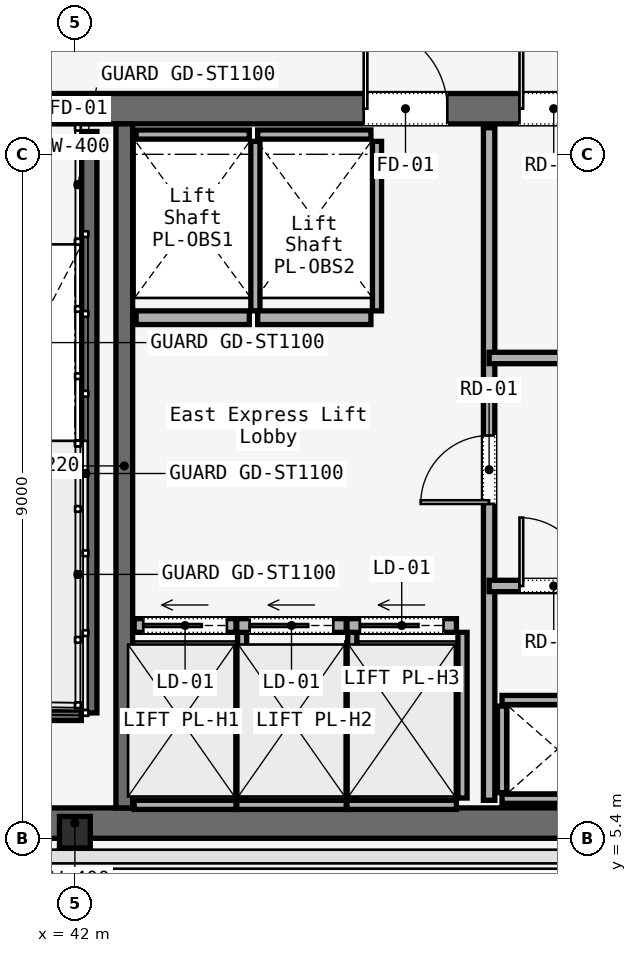
"""IFC4 building model, lengths in metres.
Left out: names, types, materials, properties, quantities, classifications, styles, units other than length and angle.
Written with IfcOpenShell. Run it as: python <this file> out.ifc"""

import sys

from ifc_helpers import new_model, si_unit, direction, frame, frame_2d, origin, origin_2d, place, context, subcontext, project, spatial, rectangle, i_section, extrude, element, fill, save


model = new_model("IFC4")
c1 = context("Model", 3, precision=1e-05, world=origin(), true_north=direction((0.0, 1.0)))
c2 = subcontext(c1, "Body", "Model", "MODEL_VIEW")
j1 = project(units=[si_unit("LENGTHUNIT", "METRE"), si_unit("PLANEANGLEUNIT", "RADIAN")], contexts=[c1])
p1 = place(None, origin())
s1 = spatial("IfcSite", under=j1, at=p1, CompositionType="ELEMENT")
p2 = place(p1, origin())
s2 = spatial("IfcBuilding", under=s1, at=p2, CompositionType="ELEMENT")
p3 = place(p2, frame((0.0, 0.0, 275.0)))
s3 = spatial("IfcBuildingStorey", under=s2, at=p3, CompositionType="ELEMENT", Elevation=275.0)
p4 = place(p3, frame((26.45, 15.0, 0.0), z_axis=(0.0, 0.0, 1.0), x_axis=(1.0, 0.0, 0.0)))
e1 = element("IfcWall", 1, at=p4, inside=s3, PredefinedType="SOLIDWALL", context=c2, shape_type="SweptSolid", body=[
    extrude(rectangle(XDim=31.1, YDim=0.4, at=frame_2d((15.55, 0.0))), origin(), (0.0, 0.0, 1.0), 3.52),
])
p5 = place(p4, frame((1.65, 0.0, 0.0)))
e2 = element("IfcOpeningElement", 2, at=p5, cuts=e1, PredefinedType="OPENING", context=c2, shape_type="SweptSolid", body=[
    extrude(rectangle(XDim=1.1, YDim=2.2, at=frame_2d((0.55, 1.1))), frame((0.0, 0.2, 0.0), z_axis=(0.0, -1.0, 0.0), x_axis=(1.0, 0.0, 0.0)), (0.0, 0.0, 1.0), 0.4),
])
p6 = place(p4, frame((13.65, 0.0, 0.0)))
e3 = element("IfcOpeningElement", 3, at=p6, cuts=e1, PredefinedType="OPENING", context=c2, shape_type="SweptSolid", body=[
    extrude(rectangle(XDim=1.1, YDim=2.2, at=frame_2d((0.55, 1.1))), frame((0.0, 0.2, 0.0), z_axis=(0.0, -1.0, 0.0), x_axis=(1.0, 0.0, 0.0)), (0.0, 0.0, 1.0), 0.4),
])
p7 = place(p4, frame((25.55, 0.0, 0.0)))
e4 = element("IfcOpeningElement", 4, at=p7, cuts=e1, PredefinedType="OPENING", context=c2, shape_type="SweptSolid", body=[
    extrude(rectangle(XDim=1.1, YDim=2.2, at=frame_2d((0.55, 1.1))), frame((0.0, 0.2, 0.0), z_axis=(0.0, -1.0, 0.0), x_axis=(1.0, 0.0, 0.0)), (0.0, 0.0, 1.0), 0.4),
])
p8 = place(p4, frame((19.35, 0.0, 0.0)))
e5 = element("IfcOpeningElement", 5, at=p8, cuts=e1, PredefinedType="OPENING", context=c2, shape_type="SweptSolid", body=[
    extrude(rectangle(XDim=1.1, YDim=2.2, at=frame_2d((0.55, 1.1))), frame((0.0, 0.2, 0.0), z_axis=(0.0, -1.0, 0.0), x_axis=(1.0, 0.0, 0.0)), (0.0, 0.0, 1.0), 0.4),
])
p9 = place(p4, frame((21.4, 0.0, 0.0)))
e6 = element("IfcOpeningElement", 6, at=p9, cuts=e1, PredefinedType="OPENING", context=c2, shape_type="SweptSolid", body=[
    extrude(rectangle(XDim=0.9, YDim=2.1, at=frame_2d((0.45, 1.05))), frame((0.0, 0.2, 0.0), z_axis=(0.0, -1.0, 0.0), x_axis=(1.0, 0.0, 0.0)), (0.0, 0.0, 1.0), 0.4),
])
p10 = place(p4, frame((5.54, 0.0, 0.0)))
e7 = element("IfcOpeningElement", 7, at=p10, cuts=e1, PredefinedType="OPENING", context=c2, shape_type="SweptSolid", body=[
    extrude(rectangle(XDim=0.95, YDim=2.2, at=frame_2d((0.475, 1.1))), frame((0.0, 0.2, 0.0), z_axis=(0.0, -1.0, 0.0), x_axis=(1.0, 0.0, 0.0)), (0.0, 0.0, 1.0), 0.4),
])
p11 = place(p4, frame((9.49, 0.0, 0.0)))
e8 = element("IfcOpeningElement", 8, at=p11, cuts=e1, PredefinedType="OPENING", context=c2, shape_type="SweptSolid", body=[
    extrude(rectangle(XDim=0.95, YDim=2.2, at=frame_2d((0.475, 1.1))), frame((0.0, 0.2, 0.0), z_axis=(0.0, -1.0, 0.0), x_axis=(1.0, 0.0, 0.0)), (0.0, 0.0, 1.0), 0.4),
])
p12 = place(p4, frame((23.35, 0.0, 0.0)))
e9 = element("IfcOpeningElement", 9, at=p12, cuts=e1, PredefinedType="OPENING", context=c2, shape_type="SweptSolid", body=[
    extrude(rectangle(XDim=1.3, YDim=2.3, at=frame_2d((0.65, 1.15))), frame((0.0, 0.2, 0.0), z_axis=(0.0, -1.0, 0.0), x_axis=(1.0, 0.0, 0.0)), (0.0, 0.0, 1.0), 0.4),
])
p13 = place(p3, frame((26.45, 5.6, 0.0), z_axis=(0.0, 0.0, 1.0), x_axis=(1.0, 0.0, 0.0)))
e10 = element("IfcWall", 10, at=p13, inside=s3, PredefinedType="SOLIDWALL", context=c2, shape_type="SweptSolid", body=[
    extrude(rectangle(XDim=31.1, YDim=0.4, at=frame_2d((15.55, 0.0))), origin(), (0.0, 0.0, 1.0), 3.52),
])
p14 = place(p3, frame((42.65, 5.8, 0.0), z_axis=(0.0, 0.0, 1.0), x_axis=(0.0, 1.0, 0.0)))
e11 = element("IfcWall", 11, at=p14, inside=s3, PredefinedType="SOLIDWALL", context=c2, shape_type="SweptSolid", body=[
    extrude(rectangle(XDim=9.0, YDim=0.22, at=frame_2d((4.5, 0.0))), origin(), (0.0, 0.0, 1.0), 3.52),
])
p15 = place(p3, frame((42.0, 5.48, 0.0), z_axis=(0.0, 0.0, 1.0), x_axis=(1.0, 0.0, 0.0)))
e12 = element("IfcColumn", 12, at=p15, inside=s3, PredefinedType="COLUMN", context=c2, shape_type="SweptSolid", body=[
    extrude(i_section(OverallWidth=0.406, OverallDepth=0.416, WebThickness=0.03, FlangeThickness=0.037, FilletRadius=0.015, at=origin_2d()), origin(), (0.0, 0.0, 1.0), 3.52),
])
p16 = place(p3, frame((42.19, 14.7, 0.0), z_axis=(0.0, 0.0, 1.0), x_axis=(0.0, -1.0, 0.0)))
e13 = element("IfcWall", 13, at=p16, inside=s3, PredefinedType="SOLIDWALL", context=c2, shape_type="SweptSolid", body=[
    extrude(rectangle(XDim=7.65, YDim=0.2, at=frame_2d((3.825, 0.0))), origin(), (0.0, 0.0, 1.0), 3.8),
])
p17 = place(p3, frame((38.97, 7.05, 0.0), z_axis=(0.0, 0.0, 1.0), x_axis=(1.0, 0.0, 0.0)))
e14 = element("IfcWall", 14, at=p17, inside=s3, PredefinedType="SOLIDWALL", context=c2, shape_type="SweptSolid", body=[
    extrude(rectangle(XDim=3.115, YDim=0.2, at=frame_2d((1.558, 0.0))), origin(), (0.0, 0.0, 1.0), 3.8),
])
for number, where, z_axis, x_axis in (
    (15, (47.62, 5.92, 0.0), (0.0, 0.0, 1.0), (1.0, 0.0, 0.0)),
    (16, (47.62, 7.22, 0.0), (0.0, 0.0, 1.0), (1.0, 0.0, 0.0)),
):
    element("IfcWall", number, at=place(p3, frame(where, z_axis=z_axis, x_axis=x_axis)), inside=s3, PredefinedType="SOLIDWALL", context=c2, shape_type="SweptSolid", body=[
        extrude(rectangle(XDim=1.46, YDim=0.12, at=frame_2d((0.73, 0.0))), origin(), (0.0, 0.0, 1.0), 2.95),
    ])
p18 = place(p3, frame((47.62, 6.0, 0.0), z_axis=(0.0, 0.0, 1.0), x_axis=(0.0, 1.0, 0.0)))
e17 = element("IfcWall", 17, at=p18, inside=s3, PredefinedType="SOLIDWALL", context=c2, shape_type="SweptSolid", body=[
    extrude(rectangle(XDim=1.14, YDim=0.12, at=frame_2d((0.57, 0.0))), origin(), (0.0, 0.0, 1.0), 2.95),
])
p19 = place(p3, frame((47.45, 5.9, 0.0), z_axis=(0.0, 0.0, 1.0), x_axis=(0.0, 1.0, 0.0)))
e18 = element("IfcWall", 18, at=p19, inside=s3, PredefinedType="PARTITIONING", context=c2, shape_type="SweptSolid", body=[
    extrude(rectangle(XDim=8.85, YDim=0.15, at=frame_2d((4.425, 0.0))), origin(), (0.0, 0.0, 1.0), 2.95),
])
p20 = place(p19, frame((3.9, 0.0, 0.0)))
e19 = element("IfcOpeningElement", 19, at=p20, cuts=e18, PredefinedType="OPENING", context=c2, shape_type="SweptSolid", body=[
    extrude(rectangle(XDim=0.9, YDim=2.1, at=frame_2d((0.45, 1.05))), frame((0.0, 0.075, 0.0), z_axis=(0.0, -1.0, 0.0), x_axis=(1.0, 0.0, 0.0)), (0.0, 0.0, 1.0), 0.15),
])
p21 = place(p3, frame((47.45, 8.72, 0.0), z_axis=(0.0, 0.0, 1.0), x_axis=(1.0, 0.0, 0.0)))
e20 = element("IfcWall", 20, at=p21, inside=s3, PredefinedType="PARTITIONING", context=c2, shape_type="SweptSolid", body=[
    extrude(rectangle(XDim=1.73, YDim=0.15, at=frame_2d((0.865, 0.0))), origin(), (0.0, 0.0, 1.0), 2.95),
])
p22 = place(p21, frame((0.4, 0.0, 0.0)))
e21 = element("IfcOpeningElement", 21, at=p22, cuts=e20, PredefinedType="OPENING", context=c2, shape_type="SweptSolid", body=[
    extrude(rectangle(XDim=0.9, YDim=2.1, at=frame_2d((0.45, 1.05))), frame((0.0, 0.075, 0.0), z_axis=(0.0, -1.0, 0.0), x_axis=(1.0, 0.0, 0.0)), (0.0, 0.0, 1.0), 0.15),
])
p23 = place(p3, frame((47.45, 11.72, 0.0), z_axis=(0.0, 0.0, 1.0), x_axis=(1.0, 0.0, 0.0)))
e22 = element("IfcWall", 22, at=p23, inside=s3, PredefinedType="PARTITIONING", context=c2, shape_type="SweptSolid", body=[
    extrude(rectangle(XDim=1.73, YDim=0.15, at=frame_2d((0.865, 0.0))), origin(), (0.0, 0.0, 1.0), 2.95),
])
p24 = place(p3, frame((42.78, 8.2, 0.0), z_axis=(0.0, 0.0, 1.0), x_axis=(1.0, 0.0, 0.0)))
e23 = element("IfcWall", 23, at=p24, inside=s3, PredefinedType="SOLIDWALL", context=c2, shape_type="SweptSolid", body=[
    extrude(rectangle(XDim=1.34, YDim=0.18, at=frame_2d((0.67, 0.0))), origin(), (0.0, 0.0, 1.0), 2.95),
])
p25 = place(p24, frame((0.12, 0.0, 0.0)))
e24 = element("IfcOpeningElement", 24, at=p25, cuts=e23, PredefinedType="OPENING", context=c2, shape_type="SweptSolid", body=[
    extrude(rectangle(XDim=1.1, YDim=2.2, at=frame_2d((0.55, 1.1))), frame((0.0, 0.09, 0.0), z_axis=(0.0, -1.0, 0.0), x_axis=(1.0, 0.0, 0.0)), (0.0, 0.0, 1.0), 0.18),
])
p26 = place(p3, frame((42.78, 5.84, 0.0), z_axis=(0.0, 0.0, 1.0), x_axis=(1.0, 0.0, 0.0)))
e25 = element("IfcWall", 25, at=p26, inside=s3, PredefinedType="SOLIDWALL", context=c2, shape_type="SweptSolid", body=[
    extrude(rectangle(XDim=1.34, YDim=0.12, at=frame_2d((0.67, 0.0))), origin(), (0.0, 0.0, 1.0), 2.95),
])
p27 = place(p3, frame((44.2, 5.93, 0.0), z_axis=(0.0, 0.0, 1.0), x_axis=(0.0, 1.0, 0.0)))
e26 = element("IfcWall", 26, at=p27, inside=s3, PredefinedType="SOLIDWALL", context=c2, shape_type="SweptSolid", body=[
    extrude(rectangle(XDim=2.18, YDim=0.12, at=frame_2d((1.09, 0.0))), origin(), (0.0, 0.0, 1.0), 2.95),
])
p28 = place(p3, frame((44.13, 8.2, 0.0), z_axis=(0.0, 0.0, 1.0), x_axis=(1.0, 0.0, 0.0)))
e27 = element("IfcWall", 27, at=p28, inside=s3, PredefinedType="SOLIDWALL", context=c2, shape_type="SweptSolid", body=[
    extrude(rectangle(XDim=1.44, YDim=0.18, at=frame_2d((0.72, 0.0))), origin(), (0.0, 0.0, 1.0), 2.95),
])
p29 = place(p28, frame((0.17, 0.0, 0.0)))
e28 = element("IfcOpeningElement", 28, at=p29, cuts=e27, PredefinedType="OPENING", context=c2, shape_type="SweptSolid", body=[
    extrude(rectangle(XDim=1.1, YDim=2.2, at=frame_2d((0.55, 1.1))), frame((0.0, 0.09, 0.0), z_axis=(0.0, -1.0, 0.0), x_axis=(1.0, 0.0, 0.0)), (0.0, 0.0, 1.0), 0.18),
])
p30 = place(p3, frame((44.13, 5.84, 0.0), z_axis=(0.0, 0.0, 1.0), x_axis=(1.0, 0.0, 0.0)))
e29 = element("IfcWall", 29, at=p30, inside=s3, PredefinedType="SOLIDWALL", context=c2, shape_type="SweptSolid", body=[
    extrude(rectangle(XDim=1.44, YDim=0.12, at=frame_2d((0.72, 0.0))), origin(), (0.0, 0.0, 1.0), 2.95),
])
p31 = place(p3, frame((45.65, 5.93, 0.0), z_axis=(0.0, 0.0, 1.0), x_axis=(0.0, 1.0, 0.0)))
e30 = element("IfcWall", 30, at=p31, inside=s3, PredefinedType="SOLIDWALL", context=c2, shape_type="SweptSolid", body=[
    extrude(rectangle(XDim=2.18, YDim=0.12, at=frame_2d((1.09, 0.0))), origin(), (0.0, 0.0, 1.0), 2.95),
])
p32 = place(p3, frame((45.58, 8.2, 0.0), z_axis=(0.0, 0.0, 1.0), x_axis=(1.0, 0.0, 0.0)))
e31 = element("IfcWall", 31, at=p32, inside=s3, PredefinedType="SOLIDWALL", context=c2, shape_type="SweptSolid", body=[
    extrude(rectangle(XDim=1.44, YDim=0.18, at=frame_2d((0.72, 0.0))), origin(), (0.0, 0.0, 1.0), 2.95),
])
p33 = place(p32, frame((0.17, 0.0, 0.0)))
e32 = element("IfcOpeningElement", 32, at=p33, cuts=e31, PredefinedType="OPENING", context=c2, shape_type="SweptSolid", body=[
    extrude(rectangle(XDim=1.1, YDim=2.2, at=frame_2d((0.55, 1.1))), frame((0.0, 0.09, 0.0), z_axis=(0.0, -1.0, 0.0), x_axis=(1.0, 0.0, 0.0)), (0.0, 0.0, 1.0), 0.18),
])
p34 = place(p3, frame((45.58, 5.84, 0.0), z_axis=(0.0, 0.0, 1.0), x_axis=(1.0, 0.0, 0.0)))
e33 = element("IfcWall", 33, at=p34, inside=s3, PredefinedType="SOLIDWALL", context=c2, shape_type="SweptSolid", body=[
    extrude(rectangle(XDim=1.44, YDim=0.12, at=frame_2d((0.72, 0.0))), origin(), (0.0, 0.0, 1.0), 2.95),
])
p35 = place(p3, frame((47.1, 5.93, 0.0), z_axis=(0.0, 0.0, 1.0), x_axis=(0.0, 1.0, 0.0)))
e34 = element("IfcWall", 34, at=p35, inside=s3, PredefinedType="SOLIDWALL", context=c2, shape_type="SweptSolid", body=[
    extrude(rectangle(XDim=2.18, YDim=0.12, at=frame_2d((1.09, 0.0))), origin(), (0.0, 0.0, 1.0), 2.95),
])
p36 = place(p3, frame((42.805, 12.25, 0.0), z_axis=(0.0, 0.0, 1.0), x_axis=(1.0, 0.0, 0.0)))
e35 = element("IfcWall", 35, at=p36, inside=s3, PredefinedType="SOLIDWALL", context=c2, shape_type="SweptSolid", body=[
    extrude(rectangle(XDim=1.49, YDim=0.18, at=frame_2d((0.745, 0.0))), origin(), (0.0, 0.0, 1.0), 2.95),
])
p37 = place(p3, frame((42.805, 14.66, 0.0), z_axis=(0.0, 0.0, 1.0), x_axis=(1.0, 0.0, 0.0)))
e36 = element("IfcWall", 36, at=p37, inside=s3, PredefinedType="SOLIDWALL", context=c2, shape_type="SweptSolid", body=[
    extrude(rectangle(XDim=1.49, YDim=0.12, at=frame_2d((0.745, 0.0))), origin(), (0.0, 0.0, 1.0), 2.95),
])
p38 = place(p3, frame((44.375, 12.34, 0.0), z_axis=(0.0, 0.0, 1.0), x_axis=(0.0, 1.0, 0.0)))
e37 = element("IfcWall", 37, at=p38, inside=s3, PredefinedType="SOLIDWALL", context=c2, shape_type="SweptSolid", body=[
    extrude(rectangle(XDim=2.23, YDim=0.12, at=frame_2d((1.115, 0.0))), origin(), (0.0, 0.0, 1.0), 2.95),
])
p39 = place(p3, frame((44.405, 12.25, 0.0), z_axis=(0.0, 0.0, 1.0), x_axis=(1.0, 0.0, 0.0)))
e38 = element("IfcWall", 38, at=p39, inside=s3, PredefinedType="SOLIDWALL", context=c2, shape_type="SweptSolid", body=[
    extrude(rectangle(XDim=1.49, YDim=0.18, at=frame_2d((0.745, 0.0))), origin(), (0.0, 0.0, 1.0), 2.95),
])
p40 = place(p3, frame((44.405, 14.66, 0.0), z_axis=(0.0, 0.0, 1.0), x_axis=(1.0, 0.0, 0.0)))
e39 = element("IfcWall", 39, at=p40, inside=s3, PredefinedType="SOLIDWALL", context=c2, shape_type="SweptSolid", body=[
    extrude(rectangle(XDim=1.49, YDim=0.12, at=frame_2d((0.745, 0.0))), origin(), (0.0, 0.0, 1.0), 2.95),
])
p41 = place(p3, frame((45.975, 12.34, 0.0), z_axis=(0.0, 0.0, 1.0), x_axis=(0.0, 1.0, 0.0)))
e40 = element("IfcWall", 40, at=p41, inside=s3, PredefinedType="SOLIDWALL", context=c2, shape_type="SweptSolid", body=[
    extrude(rectangle(XDim=2.23, YDim=0.12, at=frame_2d((1.115, 0.0))), origin(), (0.0, 0.0, 1.0), 2.95),
])
p42 = place(p8, origin())
e41 = element("IfcDoor", 41, at=p42, inside=s3, OperationType="SINGLE_SWING_LEFT", PredefinedType="DOOR", context=c2, shape_type="SweptSolid", body=[
    extrude(rectangle(XDim=1.1, YDim=2.2, at=frame_2d((0.55, 1.1))), frame((0.0, 0.025, 0.0), z_axis=(0.0, -1.0, 0.0), x_axis=(1.0, 0.0, 0.0)), (0.0, 0.0, 1.0), 0.05),
])
fill(e5, e41)
p43 = place(p9, origin())
e42 = element("IfcDoor", 42, at=p43, inside=s3, OperationType="SINGLE_SWING_LEFT", PredefinedType="DOOR", context=c2, shape_type="SweptSolid", body=[
    extrude(rectangle(XDim=0.9, YDim=2.1, at=frame_2d((0.45, 1.05))), frame((0.0, 0.025, 0.0), z_axis=(0.0, -1.0, 0.0), x_axis=(1.0, 0.0, 0.0)), (0.0, 0.0, 1.0), 0.05),
])
fill(e6, e42)
p44 = place(p20, origin())
e43 = element("IfcDoor", 43, at=p44, inside=s3, OperationType="SINGLE_SWING_LEFT", PredefinedType="DOOR", context=c2, shape_type="SweptSolid", body=[
    extrude(rectangle(XDim=0.9, YDim=2.1, at=frame_2d((0.45, 1.05))), frame((0.0, 0.025, 0.0), z_axis=(0.0, -1.0, 0.0), x_axis=(1.0, 0.0, 0.0)), (0.0, 0.0, 1.0), 0.05),
])
fill(e19, e43)
p45 = place(p22, origin())
e44 = element("IfcDoor", 44, at=p45, inside=s3, OperationType="SINGLE_SWING_RIGHT", PredefinedType="DOOR", context=c2, shape_type="SweptSolid", body=[
    extrude(rectangle(XDim=0.9, YDim=2.1, at=frame_2d((0.45, 1.05))), frame((0.0, 0.025, 0.0), z_axis=(0.0, -1.0, 0.0), x_axis=(1.0, 0.0, 0.0)), (0.0, 0.0, 1.0), 0.05),
])
fill(e21, e44)
p46 = place(p25, origin())
e45 = element("IfcDoor", 45, at=p46, inside=s3, OperationType="SLIDING_TO_LEFT", PredefinedType="DOOR", context=c2, shape_type="SweptSolid", body=[
    extrude(rectangle(XDim=1.1, YDim=2.2, at=frame_2d((0.55, 1.1))), frame((0.0, 0.025, 0.0), z_axis=(0.0, -1.0, 0.0), x_axis=(1.0, 0.0, 0.0)), (0.0, 0.0, 1.0), 0.05),
])
fill(e24, e45)
p47 = place(p29, origin())
e46 = element("IfcDoor", 46, at=p47, inside=s3, OperationType="SLIDING_TO_LEFT", PredefinedType="DOOR", context=c2, shape_type="SweptSolid", body=[
    extrude(rectangle(XDim=1.1, YDim=2.2, at=frame_2d((0.55, 1.1))), frame((0.0, 0.025, 0.0), z_axis=(0.0, -1.0, 0.0), x_axis=(1.0, 0.0, 0.0)), (0.0, 0.0, 1.0), 0.05),
])
fill(e28, e46)
p48 = place(p33, origin())
e47 = element("IfcDoor", 47, at=p48, inside=s3, OperationType="SLIDING_TO_LEFT", PredefinedType="DOOR", context=c2, shape_type="SweptSolid", body=[
    extrude(rectangle(XDim=1.1, YDim=2.2, at=frame_2d((0.55, 1.1))), frame((0.0, 0.025, 0.0), z_axis=(0.0, -1.0, 0.0), x_axis=(1.0, 0.0, 0.0)), (0.0, 0.0, 1.0), 0.05),
])
fill(e32, e47)
save(model, sys.argv[1])
